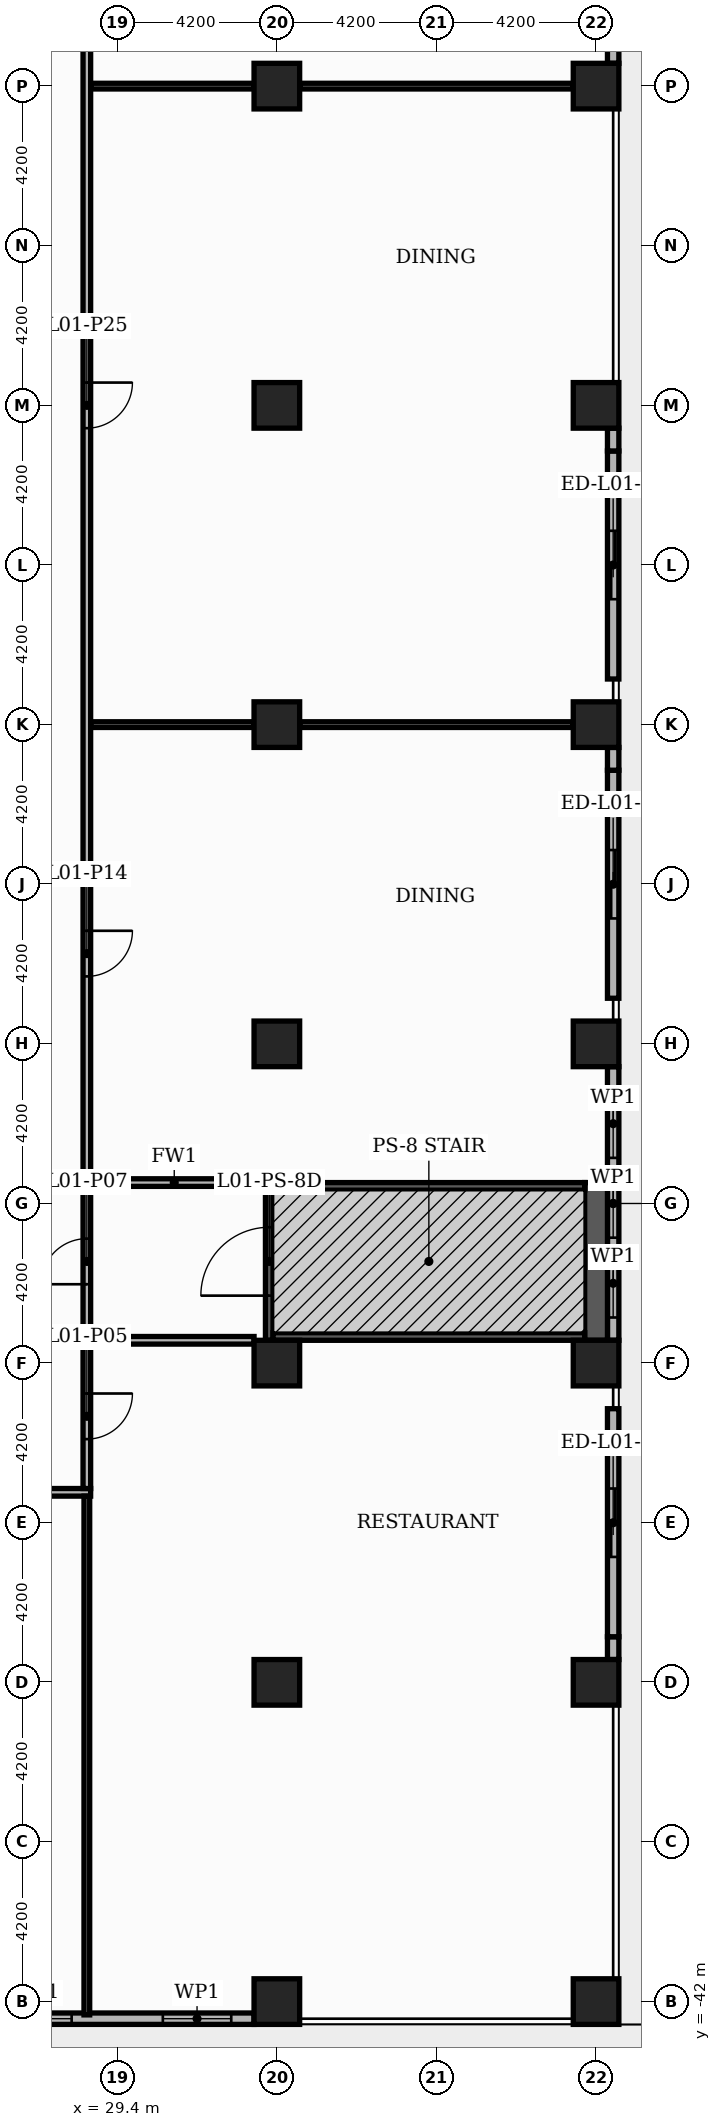
"""IFC4 building model, lengths in metres.
Left out: names, types, materials, properties, quantities, classifications, styles, units other than length and angle.
Written with IfcOpenShell. Run it as: python <this file> out.ifc"""

import sys

from ifc_helpers import new_model, si_unit, direction, frame, frame_2d, origin, origin_2d, place, context, subcontext, project, spatial, rectangle, extrude, element, fill, save


model = new_model("IFC4")
c1 = context("Model", 3, precision=1e-05, world=origin(), true_north=direction((0.0, 1.0)))
c2 = subcontext(c1, "Body", "Model", "MODEL_VIEW")
j1 = project(units=[si_unit("LENGTHUNIT", "METRE"), si_unit("PLANEANGLEUNIT", "RADIAN")], contexts=[c1])
p1 = place(None, origin())
s1 = spatial("IfcSite", under=j1, at=p1, CompositionType="ELEMENT")
p2 = place(p1, origin())
s2 = spatial("IfcBuilding", under=s1, at=p2, CompositionType="ELEMENT")
p3 = place(p2, frame((0.0, 0.0, 7.2)))
s3 = spatial("IfcBuildingStorey", under=s2, at=p3, CompositionType="ELEMENT", Elevation=7.2)
for number, where, z_axis, x_axis in (
    (1, (33.6, 0.0, 0.0), (0.0, 0.0, 1.0), (1.0, 0.0, 0.0)),
    (2, (33.6, 8.4, 0.0), (0.0, 0.0, 1.0), (1.0, 0.0, 0.0)),
    (3, (33.6, -8.4, 0.0), (0.0, 0.0, 1.0), (1.0, 0.0, 0.0)),
    (4, (33.6, -16.8, 0.0), (0.0, 0.0, 1.0), (1.0, 0.0, 0.0)),
    (5, (33.6, -25.2, 0.0), (0.0, 0.0, 1.0), (1.0, 0.0, 0.0)),
    (6, (33.6, -33.6, 0.0), (0.0, 0.0, 1.0), (1.0, 0.0, 0.0)),
    (7, (33.6, -42.0, 0.0), (0.0, 0.0, 1.0), (1.0, 0.0, 0.0)),
    (8, (42.0, 0.0, 0.0), (0.0, 0.0, 1.0), (1.0, 0.0, 0.0)),
    (9, (42.0, 8.4, 0.0), (0.0, 0.0, 1.0), (1.0, 0.0, 0.0)),
    (10, (42.0, -8.4, 0.0), (0.0, 0.0, 1.0), (1.0, 0.0, 0.0)),
    (11, (42.0, -16.8, 0.0), (0.0, 0.0, 1.0), (1.0, 0.0, 0.0)),
    (12, (42.0, -25.2, 0.0), (0.0, 0.0, 1.0), (1.0, 0.0, 0.0)),
    (13, (42.0, -33.6, 0.0), (0.0, 0.0, 1.0), (1.0, 0.0, 0.0)),
    (14, (42.0, -42.0, 0.0), (0.0, 0.0, 1.0), (1.0, 0.0, 0.0)),
):
    element("IfcColumn", number, at=place(p3, frame(where, z_axis=z_axis, x_axis=x_axis)), inside=s3, PredefinedType="COLUMN", context=c2, shape_type="SweptSolid", body=[
        extrude(rectangle(XDim=1.2, YDim=1.2, at=origin_2d()), origin(), (0.0, 0.0, 1.0), 4.8),
    ])
p4 = place(p3, frame((25.8, -42.45, 0.0), z_axis=(0.0, 0.0, 1.0), x_axis=(1.0, 0.0, 0.0)))
e15 = element("IfcWall", 15, at=p4, inside=s3, PredefinedType="STANDARD", context=c2, shape_type="SweptSolid", body=[
    extrude(rectangle(XDim=7.2, YDim=0.3, at=frame_2d((3.6, 0.0))), origin(), (0.0, 0.0, 1.0), 4.38),
])
p5 = place(p4, frame((0.6, 0.0, 0.6)))
e16 = element("IfcOpeningElement", 16, at=p5, cuts=e15, PredefinedType="OPENING", context=c2, shape_type="SweptSolid", body=[
    extrude(rectangle(XDim=1.8, YDim=3.0, at=frame_2d((0.9, 1.5))), frame((0.0, 0.16, 0.0), z_axis=(0.0, -1.0, 0.0), x_axis=(1.0, 0.0, 0.0)), (0.0, 0.0, 1.0), 0.32),
])
p6 = place(p4, frame((4.8, 0.0, 0.6)))
e17 = element("IfcOpeningElement", 17, at=p6, cuts=e15, PredefinedType="OPENING", context=c2, shape_type="SweptSolid", body=[
    extrude(rectangle(XDim=1.8, YDim=3.0, at=frame_2d((0.9, 1.5))), frame((0.0, 0.16, 0.0), z_axis=(0.0, -1.0, 0.0), x_axis=(1.0, 0.0, 0.0)), (0.0, 0.0, 1.0), 0.32),
])
p7 = place(p3, frame((42.45, -33.0, 0.0), z_axis=(0.0, 0.0, 1.0), x_axis=(0.0, 1.0, 0.0)))
e18 = element("IfcWall", 18, at=p7, inside=s3, PredefinedType="STANDARD", context=c2, shape_type="SweptSolid", body=[
    extrude(rectangle(XDim=0.6, YDim=0.3, at=frame_2d((0.3, 0.0))), origin(), (0.0, 0.0, 1.0), 4.38),
])
p8 = place(p3, frame((42.45, -32.4, 0.0), z_axis=(0.0, 0.0, 1.0), x_axis=(0.0, 1.0, 0.0)))
e19 = element("IfcWall", 19, at=p8, inside=s3, PredefinedType="STANDARD", context=c2, shape_type="SweptSolid", body=[
    extrude(rectangle(XDim=6.0, YDim=0.3, at=frame_2d((3.0, 0.0))), origin(), (0.0, 0.0, 1.0), 4.38),
])
p9 = place(p8, frame((2.1, 0.0, 0.0)))
e20 = element("IfcOpeningElement", 20, at=p9, cuts=e19, PredefinedType="OPENING", context=c2, shape_type="SweptSolid", body=[
    extrude(rectangle(XDim=1.8, YDim=2.4, at=frame_2d((0.9, 1.2))), frame((0.0, 0.16, 0.0), z_axis=(0.0, -1.0, 0.0), x_axis=(1.0, 0.0, 0.0)), (0.0, 0.0, 1.0), 0.32),
])
p10 = place(p3, frame((42.45, -24.6, 0.0), z_axis=(0.0, 0.0, 1.0), x_axis=(0.0, 1.0, 0.0)))
e21 = element("IfcWall", 21, at=p10, inside=s3, PredefinedType="STANDARD", context=c2, shape_type="SweptSolid", body=[
    extrude(rectangle(XDim=7.2, YDim=0.3, at=frame_2d((3.6, 0.0))), origin(), (0.0, 0.0, 1.0), 4.38),
])
p11 = place(p10, frame((0.6, 0.0, 0.6)))
e22 = element("IfcOpeningElement", 22, at=p11, cuts=e21, PredefinedType="OPENING", context=c2, shape_type="SweptSolid", body=[
    extrude(rectangle(XDim=1.8, YDim=3.0, at=frame_2d((0.9, 1.5))), frame((0.0, 0.16, 0.0), z_axis=(0.0, -1.0, 0.0), x_axis=(1.0, 0.0, 0.0)), (0.0, 0.0, 1.0), 0.32),
])
p12 = place(p10, frame((2.7, 0.0, 0.6)))
e23 = element("IfcOpeningElement", 23, at=p12, cuts=e21, PredefinedType="OPENING", context=c2, shape_type="SweptSolid", body=[
    extrude(rectangle(XDim=1.8, YDim=3.0, at=frame_2d((0.9, 1.5))), frame((0.0, 0.16, 0.0), z_axis=(0.0, -1.0, 0.0), x_axis=(1.0, 0.0, 0.0)), (0.0, 0.0, 1.0), 0.32),
])
p13 = place(p10, frame((4.8, 0.0, 0.6)))
e24 = element("IfcOpeningElement", 24, at=p13, cuts=e21, PredefinedType="OPENING", context=c2, shape_type="SweptSolid", body=[
    extrude(rectangle(XDim=1.8, YDim=3.0, at=frame_2d((0.9, 1.5))), frame((0.0, 0.16, 0.0), z_axis=(0.0, -1.0, 0.0), x_axis=(1.0, 0.0, 0.0)), (0.0, 0.0, 1.0), 0.32),
])
p14 = place(p3, frame((42.45, -15.6, 0.0), z_axis=(0.0, 0.0, 1.0), x_axis=(0.0, 1.0, 0.0)))
e25 = element("IfcWall", 25, at=p14, inside=s3, PredefinedType="STANDARD", context=c2, shape_type="SweptSolid", body=[
    extrude(rectangle(XDim=6.0, YDim=0.3, at=frame_2d((3.0, 0.0))), origin(), (0.0, 0.0, 1.0), 4.38),
])
p15 = place(p14, frame((2.1, 0.0, 0.0)))
e26 = element("IfcOpeningElement", 26, at=p15, cuts=e25, PredefinedType="OPENING", context=c2, shape_type="SweptSolid", body=[
    extrude(rectangle(XDim=1.8, YDim=2.4, at=frame_2d((0.9, 1.2))), frame((0.0, 0.16, 0.0), z_axis=(0.0, -1.0, 0.0), x_axis=(1.0, 0.0, 0.0)), (0.0, 0.0, 1.0), 0.32),
])
p16 = place(p3, frame((42.45, -9.6, 0.0), z_axis=(0.0, 0.0, 1.0), x_axis=(0.0, 1.0, 0.0)))
e27 = element("IfcWall", 27, at=p16, inside=s3, PredefinedType="STANDARD", context=c2, shape_type="SweptSolid", body=[
    extrude(rectangle(XDim=0.6, YDim=0.3, at=frame_2d((0.3, 0.0))), origin(), (0.0, 0.0, 1.0), 4.38),
])
p17 = place(p3, frame((42.45, -7.2, 0.0), z_axis=(0.0, 0.0, 1.0), x_axis=(0.0, 1.0, 0.0)))
e28 = element("IfcWall", 28, at=p17, inside=s3, PredefinedType="STANDARD", context=c2, shape_type="SweptSolid", body=[
    extrude(rectangle(XDim=6.0, YDim=0.3, at=frame_2d((3.0, 0.0))), origin(), (0.0, 0.0, 1.0), 4.38),
])
p18 = place(p17, frame((2.1, 0.0, 0.0)))
e29 = element("IfcOpeningElement", 29, at=p18, cuts=e28, PredefinedType="OPENING", context=c2, shape_type="SweptSolid", body=[
    extrude(rectangle(XDim=1.8, YDim=2.4, at=frame_2d((0.9, 1.2))), frame((0.0, 0.16, 0.0), z_axis=(0.0, -1.0, 0.0), x_axis=(1.0, 0.0, 0.0)), (0.0, 0.0, 1.0), 0.32),
])
p19 = place(p3, frame((42.45, -1.2, 0.0), z_axis=(0.0, 0.0, 1.0), x_axis=(0.0, 1.0, 0.0)))
e30 = element("IfcWall", 30, at=p19, inside=s3, PredefinedType="STANDARD", context=c2, shape_type="SweptSolid", body=[
    extrude(rectangle(XDim=0.6, YDim=0.3, at=frame_2d((0.3, 0.0))), origin(), (0.0, 0.0, 1.0), 4.38),
])
p20 = place(p3, frame((42.45, 9.0, 0.0), z_axis=(0.0, 0.0, 1.0), x_axis=(0.0, 1.0, 0.0)))
e31 = element("IfcWall", 31, at=p20, inside=s3, PredefinedType="STANDARD", context=c2, shape_type="SweptSolid", body=[
    extrude(rectangle(XDim=0.6, YDim=0.3, at=frame_2d((0.3, 0.0))), origin(), (0.0, 0.0, 1.0), 4.38),
])
p21 = place(p3, frame((-28.7, -28.6, 0.0), z_axis=(0.0, 0.0, 1.0), x_axis=(1.0, 0.0, 0.0)))
e32 = element("IfcWall", 32, at=p21, inside=s3, PredefinedType="PARTITIONING", context=c2, shape_type="SweptSolid", body=[
    extrude(rectangle(XDim=57.4, YDim=0.2, at=frame_2d((28.7, 0.0))), origin(), (0.0, 0.0, 1.0), 3.98),
])
p22 = place(p21, frame((9.6, 0.0, 0.0)))
e33 = element("IfcOpeningElement", 33, at=p22, cuts=e32, PredefinedType="OPENING", context=c2, shape_type="SweptSolid", body=[
    extrude(rectangle(XDim=1.2, YDim=2.2, at=frame_2d((0.6, 1.1))), frame((0.0, 0.11, 0.0), z_axis=(0.0, -1.0, 0.0), x_axis=(1.0, 0.0, 0.0)), (0.0, 0.0, 1.0), 0.22),
])
p23 = place(p21, frame((28.1, 0.0, 0.0)))
e34 = element("IfcOpeningElement", 34, at=p23, cuts=e32, PredefinedType="OPENING", context=c2, shape_type="SweptSolid", body=[
    extrude(rectangle(XDim=1.2, YDim=2.2, at=frame_2d((0.6, 1.1))), frame((0.0, 0.11, 0.0), z_axis=(0.0, -1.0, 0.0), x_axis=(1.0, 0.0, 0.0)), (0.0, 0.0, 1.0), 0.22),
])
p24 = place(p21, frame((46.6, 0.0, 0.0)))
e35 = element("IfcOpeningElement", 35, at=p24, cuts=e32, PredefinedType="OPENING", context=c2, shape_type="SweptSolid", body=[
    extrude(rectangle(XDim=1.2, YDim=2.2, at=frame_2d((0.6, 1.1))), frame((0.0, 0.11, 0.0), z_axis=(0.0, -1.0, 0.0), x_axis=(1.0, 0.0, 0.0)), (0.0, 0.0, 1.0), 0.22),
])
p25 = place(p3, frame((28.5, -24.6, 0.0), z_axis=(0.0, 0.0, 1.0), x_axis=(1.0, 0.0, 0.0)))
e36 = element("IfcWall", 36, at=p25, inside=s3, PredefinedType="PARTITIONING", context=c2, shape_type="SweptSolid", body=[
    extrude(rectangle(XDim=4.5, YDim=0.2, at=frame_2d((2.25, 0.0))), origin(), (0.0, 0.0, 1.0), 4.38),
])
p26 = place(p3, frame((28.5, -20.45, 0.0), z_axis=(0.0, 0.0, 1.0), x_axis=(1.0, 0.0, 0.0)))
e37 = element("IfcWall", 37, at=p26, inside=s3, PredefinedType="PARTITIONING", context=c2, shape_type="SweptSolid", body=[
    extrude(rectangle(XDim=4.8, YDim=0.2, at=frame_2d((2.4, 0.0))), origin(), (0.0, 0.0, 1.0), 4.38),
])
p27 = place(p3, frame((28.7, -8.4, 0.0), z_axis=(0.0, 0.0, 1.0), x_axis=(1.0, 0.0, 0.0)))
e38 = element("IfcWall", 38, at=p27, inside=s3, PredefinedType="PARTITIONING", context=c2, shape_type="SweptSolid", body=[
    extrude(rectangle(XDim=4.3, YDim=0.15, at=frame_2d((2.15, 0.0))), origin(), (0.0, 0.0, 1.0), 4.08),
])
p28 = place(p3, frame((34.2, -8.4, 0.0), z_axis=(0.0, 0.0, 1.0), x_axis=(1.0, 0.0, 0.0)))
e39 = element("IfcWall", 39, at=p28, inside=s3, PredefinedType="PARTITIONING", context=c2, shape_type="SweptSolid", body=[
    extrude(rectangle(XDim=7.2, YDim=0.15, at=frame_2d((3.6, 0.0))), origin(), (0.0, 0.0, 1.0), 4.08),
])
p29 = place(p3, frame((28.7, 8.4, 0.0), z_axis=(0.0, 0.0, 1.0), x_axis=(1.0, 0.0, 0.0)))
e40 = element("IfcWall", 40, at=p29, inside=s3, PredefinedType="PARTITIONING", context=c2, shape_type="SweptSolid", body=[
    extrude(rectangle(XDim=4.3, YDim=0.15, at=frame_2d((2.15, 0.0))), origin(), (0.0, 0.0, 1.0), 4.08),
])
p30 = place(p3, frame((34.2, 8.4, 0.0), z_axis=(0.0, 0.0, 1.0), x_axis=(1.0, 0.0, 0.0)))
e41 = element("IfcWall", 41, at=p30, inside=s3, PredefinedType="PARTITIONING", context=c2, shape_type="SweptSolid", body=[
    extrude(rectangle(XDim=7.2, YDim=0.15, at=frame_2d((3.6, 0.0))), origin(), (0.0, 0.0, 1.0), 4.08),
])
p31 = place(p3, frame((28.6, -42.35, 0.0), z_axis=(0.0, 0.0, 1.0), x_axis=(0.0, 1.0, 0.0)))
e42 = element("IfcWall", 42, at=p31, inside=s3, PredefinedType="PARTITIONING", context=c2, shape_type="SweptSolid", body=[
    extrude(rectangle(XDim=13.65, YDim=0.15, at=frame_2d((6.825, 0.0))), origin(), (0.0, 0.0, 1.0), 4.08),
])
p32 = place(p3, frame((28.6, -28.5, 0.0), z_axis=(0.0, 0.0, 1.0), x_axis=(0.0, 1.0, 0.0)))
e43 = element("IfcWall", 43, at=p32, inside=s3, PredefinedType="PARTITIONING", context=c2, shape_type="SweptSolid", body=[
    extrude(rectangle(XDim=3.8, YDim=0.2, at=frame_2d((1.9, 0.0))), origin(), (0.0, 0.0, 1.0), 4.08),
])
p33 = place(p32, frame((1.3, 0.0, 0.0)))
e44 = element("IfcOpeningElement", 44, at=p33, cuts=e43, PredefinedType="OPENING", context=c2, shape_type="SweptSolid", body=[
    extrude(rectangle(XDim=1.2, YDim=2.2, at=frame_2d((0.6, 1.1))), frame((0.0, 0.11, 0.0), z_axis=(0.0, -1.0, 0.0), x_axis=(1.0, 0.0, 0.0)), (0.0, 0.0, 1.0), 0.22),
])
p34 = place(p3, frame((28.6, -24.5, 0.0), z_axis=(0.0, 0.0, 1.0), x_axis=(0.0, 1.0, 0.0)))
e45 = element("IfcWall", 45, at=p34, inside=s3, PredefinedType="PARTITIONING", context=c2, shape_type="SweptSolid", body=[
    extrude(rectangle(XDim=3.95, YDim=0.2, at=frame_2d((1.975, 0.0))), origin(), (0.0, 0.0, 1.0), 4.38),
])
p35 = place(p34, frame((1.375, 0.0, 0.0)))
e46 = element("IfcOpeningElement", 46, at=p35, cuts=e45, PredefinedType="OPENING", context=c2, shape_type="SweptSolid", body=[
    extrude(rectangle(XDim=1.2, YDim=2.2, at=frame_2d((0.6, 1.1))), frame((0.0, 0.11, 0.0), z_axis=(0.0, -1.0, 0.0), x_axis=(1.0, 0.0, 0.0)), (0.0, 0.0, 1.0), 0.22),
])
p36 = place(p3, frame((28.6, -20.35, 0.0), z_axis=(0.0, 0.0, 1.0), x_axis=(0.0, 1.0, 0.0)))
e47 = element("IfcWall", 47, at=p36, inside=s3, PredefinedType="PARTITIONING", context=c2, shape_type="SweptSolid", body=[
    extrude(rectangle(XDim=40.7, YDim=0.2, at=frame_2d((20.35, 0.0))), origin(), (0.0, 0.0, 1.0), 4.08),
])
p37 = place(p36, frame((5.325, 0.0, 0.0)))
e48 = element("IfcOpeningElement", 48, at=p37, cuts=e47, PredefinedType="OPENING", context=c2, shape_type="SweptSolid", body=[
    extrude(rectangle(XDim=1.2, YDim=2.2, at=frame_2d((0.6, 1.1))), frame((0.0, 0.11, 0.0), z_axis=(0.0, -1.0, 0.0), x_axis=(1.0, 0.0, 0.0)), (0.0, 0.0, 1.0), 0.22),
])
p38 = place(p36, frame((19.75, 0.0, 0.0)))
e49 = element("IfcOpeningElement", 49, at=p38, cuts=e47, PredefinedType="OPENING", context=c2, shape_type="SweptSolid", body=[
    extrude(rectangle(XDim=1.2, YDim=2.2, at=frame_2d((0.6, 1.1))), frame((0.0, 0.11, 0.0), z_axis=(0.0, -1.0, 0.0), x_axis=(1.0, 0.0, 0.0)), (0.0, 0.0, 1.0), 0.22),
])
p39 = place(p36, frame((34.175, 0.0, 0.0)))
e50 = element("IfcOpeningElement", 50, at=p39, cuts=e47, PredefinedType="OPENING", context=c2, shape_type="SweptSolid", body=[
    extrude(rectangle(XDim=1.2, YDim=2.2, at=frame_2d((0.6, 1.1))), frame((0.0, 0.11, 0.0), z_axis=(0.0, -1.0, 0.0), x_axis=(1.0, 0.0, 0.0)), (0.0, 0.0, 1.0), 0.22),
])
p40 = place(p3, frame((33.4, -24.6, 0.0), z_axis=(0.0, 0.0, 1.0), x_axis=(0.0, 1.0, 0.0)))
e51 = element("IfcWall", 51, at=p40, inside=s3, PredefinedType="SOLIDWALL", context=c2, shape_type="SweptSolid", body=[
    extrude(rectangle(XDim=4.15, YDim=0.2, at=frame_2d((2.075, 0.0))), origin(), (0.0, 0.0, 1.0), 3.98),
])
p41 = place(p40, frame((1.175, 0.0, 0.0)))
e52 = element("IfcOpeningElement", 52, at=p41, cuts=e51, PredefinedType="OPENING", context=c2, shape_type="SweptSolid", body=[
    extrude(rectangle(XDim=1.8, YDim=2.2, at=frame_2d((0.9, 1.1))), frame((0.0, 0.11, 0.0), z_axis=(0.0, -1.0, 0.0), x_axis=(1.0, 0.0, 0.0)), (0.0, 0.0, 1.0), 0.22),
])
p42 = place(p3, frame((42.0, -24.6, 0.0), z_axis=(0.0, 0.0, 1.0), x_axis=(0.0, 1.0, 0.0)))
e53 = element("IfcWall", 53, at=p42, inside=s3, PredefinedType="SOLIDWALL", context=c2, shape_type="SweptSolid", body=[
    extrude(rectangle(XDim=4.15, YDim=0.6, at=frame_2d((2.075, 0.0))), origin(), (0.0, 0.0, 1.0), 3.98),
])
for number, where, z_axis, x_axis in (
    (54, (33.5, -24.5, 0.0), (0.0, 0.0, 1.0), (1.0, 0.0, 0.0)),
    (55, (33.5, -20.55, 0.0), (0.0, 0.0, 1.0), (1.0, 0.0, 0.0)),
):
    element("IfcWall", number, at=place(p3, frame(where, z_axis=z_axis, x_axis=x_axis)), inside=s3, PredefinedType="SOLIDWALL", context=c2, shape_type="SweptSolid", body=[
        extrude(rectangle(XDim=8.2, YDim=0.2, at=frame_2d((4.1, 0.0))), origin(), (0.0, 0.0, 1.0), 4.6),
    ])
p43 = place(p5, origin())
e56 = element("IfcWindow", 56, at=p43, inside=s3, PartitioningType="SINGLE_PANEL", PredefinedType="WINDOW", context=c2, shape_type="SweptSolid", body=[
    extrude(rectangle(XDim=1.8, YDim=3.0, at=frame_2d((0.9, 1.5))), frame((0.0, 0.03, 0.0), z_axis=(0.0, -1.0, 0.0), x_axis=(1.0, 0.0, 0.0)), (0.0, 0.0, 1.0), 0.06),
])
fill(e16, e56)
p44 = place(p6, origin())
e57 = element("IfcWindow", 57, at=p44, inside=s3, PartitioningType="SINGLE_PANEL", PredefinedType="WINDOW", context=c2, shape_type="SweptSolid", body=[
    extrude(rectangle(XDim=1.8, YDim=3.0, at=frame_2d((0.9, 1.5))), frame((0.0, 0.03, 0.0), z_axis=(0.0, -1.0, 0.0), x_axis=(1.0, 0.0, 0.0)), (0.0, 0.0, 1.0), 0.06),
])
fill(e17, e57)
p45 = place(p9, origin())
e58 = element("IfcDoor", 58, at=p45, inside=s3, OperationType="SLIDING_TO_LEFT", PredefinedType="DOOR", context=c2, shape_type="SweptSolid", body=[
    extrude(rectangle(XDim=1.8, YDim=2.4, at=frame_2d((0.9, 1.2))), frame((0.0, 0.025, 0.0), z_axis=(0.0, -1.0, 0.0), x_axis=(1.0, 0.0, 0.0)), (0.0, 0.0, 1.0), 0.05),
])
fill(e20, e58)
p46 = place(p11, origin())
e59 = element("IfcWindow", 59, at=p46, inside=s3, PartitioningType="SINGLE_PANEL", PredefinedType="WINDOW", context=c2, shape_type="SweptSolid", body=[
    extrude(rectangle(XDim=1.8, YDim=3.0, at=frame_2d((0.9, 1.5))), frame((0.0, 0.03, 0.0), z_axis=(0.0, -1.0, 0.0), x_axis=(1.0, 0.0, 0.0)), (0.0, 0.0, 1.0), 0.06),
])
fill(e22, e59)
p47 = place(p12, origin())
e60 = element("IfcWindow", 60, at=p47, inside=s3, PartitioningType="SINGLE_PANEL", PredefinedType="WINDOW", context=c2, shape_type="SweptSolid", body=[
    extrude(rectangle(XDim=1.8, YDim=3.0, at=frame_2d((0.9, 1.5))), frame((0.0, 0.03, 0.0), z_axis=(0.0, -1.0, 0.0), x_axis=(1.0, 0.0, 0.0)), (0.0, 0.0, 1.0), 0.06),
])
fill(e23, e60)
p48 = place(p13, origin())
e61 = element("IfcWindow", 61, at=p48, inside=s3, PartitioningType="SINGLE_PANEL", PredefinedType="WINDOW", context=c2, shape_type="SweptSolid", body=[
    extrude(rectangle(XDim=1.8, YDim=3.0, at=frame_2d((0.9, 1.5))), frame((0.0, 0.03, 0.0), z_axis=(0.0, -1.0, 0.0), x_axis=(1.0, 0.0, 0.0)), (0.0, 0.0, 1.0), 0.06),
])
fill(e24, e61)
p49 = place(p15, origin())
e62 = element("IfcDoor", 62, at=p49, inside=s3, OperationType="SLIDING_TO_RIGHT", PredefinedType="DOOR", context=c2, shape_type="SweptSolid", body=[
    extrude(rectangle(XDim=1.8, YDim=2.4, at=frame_2d((0.9, 1.2))), frame((0.0, 0.025, 0.0), z_axis=(0.0, -1.0, 0.0), x_axis=(1.0, 0.0, 0.0)), (0.0, 0.0, 1.0), 0.05),
])
fill(e26, e62)
p50 = place(p18, origin())
e63 = element("IfcDoor", 63, at=p50, inside=s3, OperationType="SLIDING_TO_LEFT", PredefinedType="DOOR", context=c2, shape_type="SweptSolid", body=[
    extrude(rectangle(XDim=1.8, YDim=2.4, at=frame_2d((0.9, 1.2))), frame((0.0, 0.025, 0.0), z_axis=(0.0, -1.0, 0.0), x_axis=(1.0, 0.0, 0.0)), (0.0, 0.0, 1.0), 0.05),
])
fill(e29, e63)
p51 = place(p33, origin())
e64 = element("IfcDoor", 64, at=p51, inside=s3, OperationType="SINGLE_SWING_RIGHT", PredefinedType="DOOR", context=c2, shape_type="SweptSolid", body=[
    extrude(rectangle(XDim=1.2, YDim=2.2, at=frame_2d((0.6, 1.1))), frame((0.0, 0.025, 0.0), z_axis=(0.0, -1.0, 0.0), x_axis=(1.0, 0.0, 0.0)), (0.0, 0.0, 1.0), 0.05),
])
fill(e44, e64)
p52 = place(p35, origin())
e65 = element("IfcDoor", 65, at=p52, inside=s3, OperationType="SINGLE_SWING_LEFT", PredefinedType="DOOR", context=c2, shape_type="SweptSolid", body=[
    extrude(rectangle(XDim=1.2, YDim=2.2, at=frame_2d((0.6, 1.1))), frame((0.0, 0.025, 0.0), z_axis=(0.0, -1.0, 0.0), x_axis=(1.0, 0.0, 0.0)), (0.0, 0.0, 1.0), 0.05),
])
fill(e46, e65)
p53 = place(p37, origin())
e66 = element("IfcDoor", 66, at=p53, inside=s3, OperationType="SINGLE_SWING_RIGHT", PredefinedType="DOOR", context=c2, shape_type="SweptSolid", body=[
    extrude(rectangle(XDim=1.2, YDim=2.2, at=frame_2d((0.6, 1.1))), frame((0.0, 0.025, 0.0), z_axis=(0.0, -1.0, 0.0), x_axis=(1.0, 0.0, 0.0)), (0.0, 0.0, 1.0), 0.05),
])
fill(e48, e66)
p54 = place(p38, origin())
e67 = element("IfcDoor", 67, at=p54, inside=s3, OperationType="SINGLE_SWING_RIGHT", PredefinedType="DOOR", context=c2, shape_type="SweptSolid", body=[
    extrude(rectangle(XDim=1.2, YDim=2.2, at=frame_2d((0.6, 1.1))), frame((0.0, 0.025, 0.0), z_axis=(0.0, -1.0, 0.0), x_axis=(1.0, 0.0, 0.0)), (0.0, 0.0, 1.0), 0.05),
])
fill(e49, e67)
p55 = place(p41, origin())
e68 = element("IfcDoor", 68, at=p55, inside=s3, OperationType="DOUBLE_DOOR_SINGLE_SWING", PredefinedType="DOOR", context=c2, shape_type="SweptSolid", body=[
    extrude(rectangle(XDim=1.8, YDim=2.2, at=frame_2d((0.9, 1.1))), frame((0.0, 0.025, 0.0), z_axis=(0.0, -1.0, 0.0), x_axis=(1.0, 0.0, 0.0)), (0.0, 0.0, 1.0), 0.05),
])
fill(e52, e68)
save(model, sys.argv[1])
